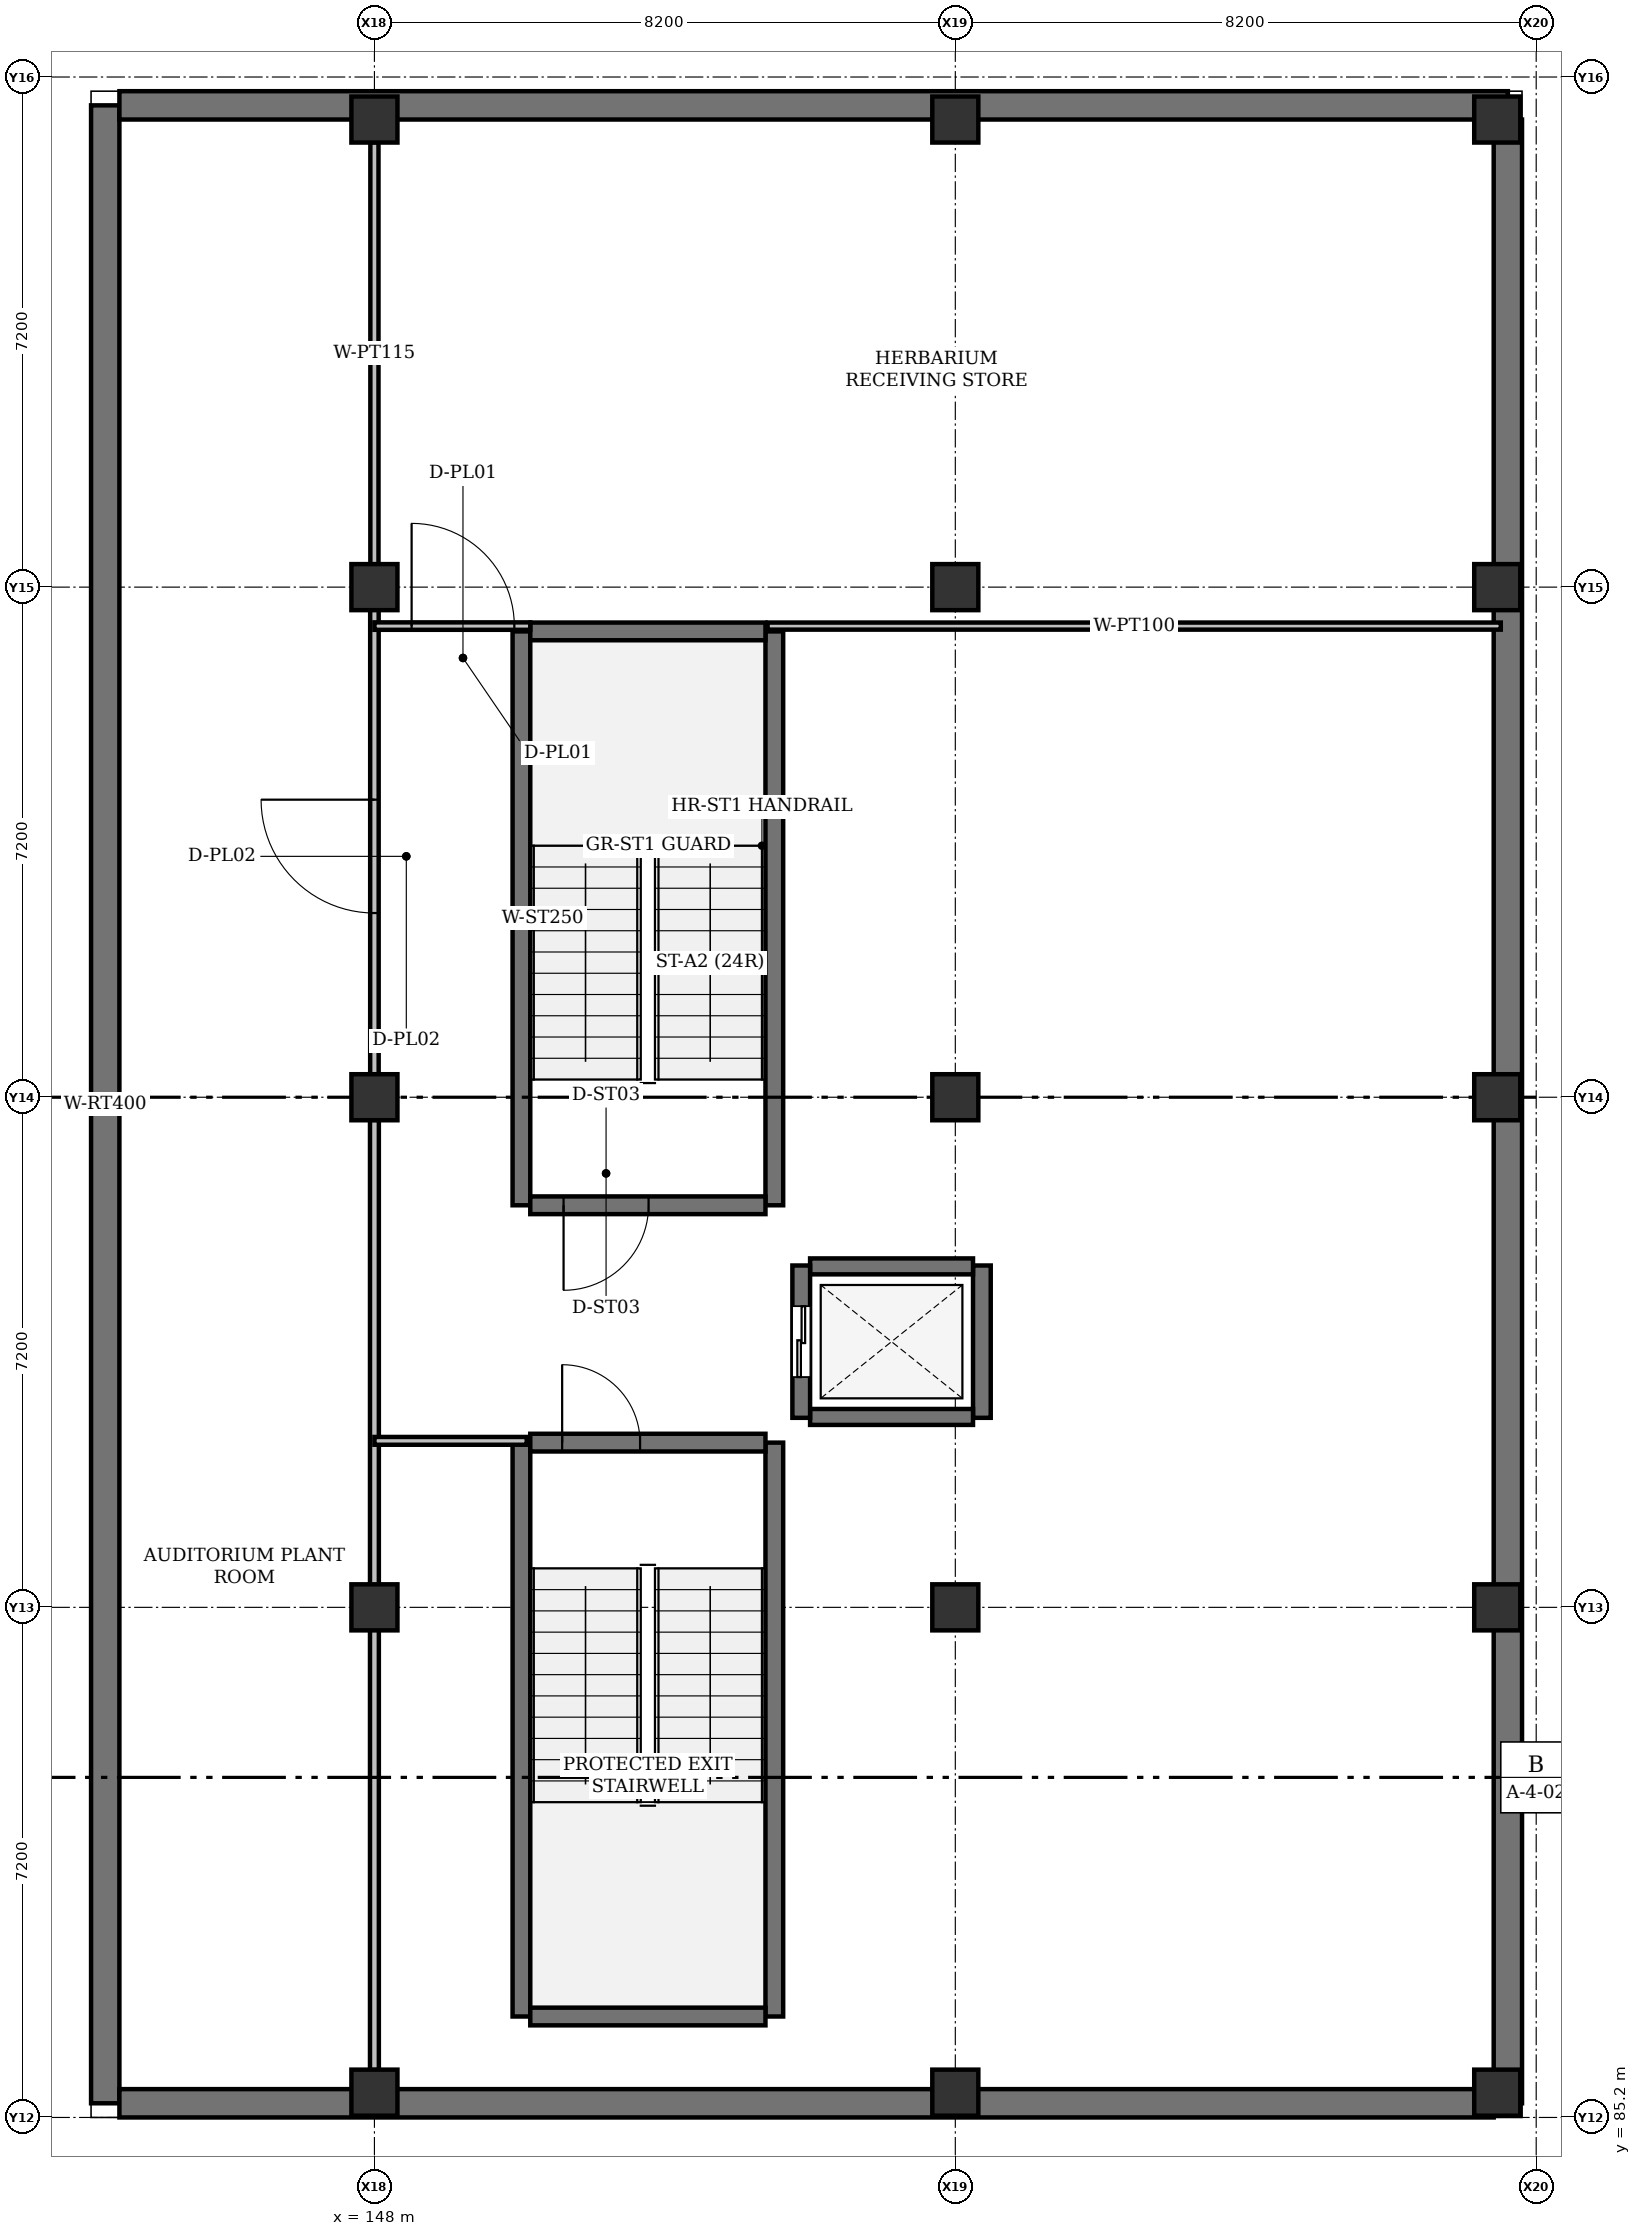
"""IFC4 building model, lengths in metres.
Left out: names, types, materials, properties, quantities, classifications, styles, units other than length and angle.
Written with IfcOpenShell. Run it as: python <this file> out.ifc"""

import sys

from ifc_helpers import new_model, si_unit, direction, frame, frame_2d, origin, origin_2d, place, context, subcontext, project, spatial, rectangle, extrude, element, fill, save


model = new_model("IFC4")
c1 = context("Model", 3, precision=1e-05, world=origin(), true_north=direction((0.0, 1.0)))
c2 = subcontext(c1, "Body", "Model", "MODEL_VIEW")
j1 = project(units=[si_unit("LENGTHUNIT", "METRE"), si_unit("PLANEANGLEUNIT", "RADIAN")], contexts=[c1])
p1 = place(None, origin())
s1 = spatial("IfcSite", under=j1, at=p1, CompositionType="ELEMENT")
p2 = place(p1, origin())
s2 = spatial("IfcBuilding", under=s1, at=p2, CompositionType="ELEMENT")
p3 = place(p2, frame((0.0, 0.0, -8.4)))
s3 = spatial("IfcBuildingStorey", under=s2, at=p3, CompositionType="ELEMENT", Elevation=-8.4)
for number, where, z_axis, x_axis in (
    (1, (148.0, 85.55, -0.3), (0.0, 0.0, 1.0), (1.0, 0.0, 0.0)),
    (2, (148.0, 92.4, -0.3), (0.0, 0.0, 1.0), (1.0, 0.0, 0.0)),
    (3, (148.0, 99.6, -0.3), (0.0, 0.0, 1.0), (1.0, 0.0, 0.0)),
    (4, (148.0, 106.8, -0.3), (0.0, 0.0, 1.0), (1.0, 0.0, 0.0)),
    (5, (148.0, 113.4, -0.3), (0.0, 0.0, 1.0), (1.0, 0.0, 0.0)),
    (6, (156.2, 85.55, -0.3), (0.0, 0.0, 1.0), (1.0, 0.0, 0.0)),
    (7, (156.2, 92.4, -0.3), (0.0, 0.0, 1.0), (1.0, 0.0, 0.0)),
    (8, (156.2, 99.6, -0.3), (0.0, 0.0, 1.0), (1.0, 0.0, 0.0)),
    (9, (156.2, 106.8, -0.3), (0.0, 0.0, 1.0), (1.0, 0.0, 0.0)),
    (10, (156.2, 113.4, -0.3), (0.0, 0.0, 1.0), (1.0, 0.0, 0.0)),
    (11, (163.85, 85.55, -0.3), (0.0, 0.0, 1.0), (1.0, 0.0, 0.0)),
    (12, (163.85, 92.4, -0.3), (0.0, 0.0, 1.0), (1.0, 0.0, 0.0)),
    (13, (163.85, 99.6, -0.3), (0.0, 0.0, 1.0), (1.0, 0.0, 0.0)),
    (14, (163.85, 106.8, -0.3), (0.0, 0.0, 1.0), (1.0, 0.0, 0.0)),
    (15, (163.85, 113.4, -0.3), (0.0, 0.0, 1.0), (1.0, 0.0, 0.0)),
):
    element("IfcColumn", number, at=place(p3, frame(where, z_axis=z_axis, x_axis=x_axis)), inside=s3, PredefinedType="COLUMN", context=c2, shape_type="SweptSolid", body=[
        extrude(rectangle(XDim=0.65, YDim=0.65, at=origin_2d()), origin(), (0.0, 0.0, 1.0), 4.5),
    ])
p4 = place(p3, frame((144.2, 85.4, -0.3), z_axis=(0.0, 0.0, 1.0), x_axis=(0.0, 1.0, 0.0)))
e16 = element("IfcWall", 16, at=p4, inside=s3, PredefinedType="USERDEFINED", context=c2, shape_type="SweptSolid", body=[
    extrude(rectangle(XDim=28.2, YDim=0.4, at=frame_2d((14.1, 0.0))), origin(), (0.0, 0.0, 1.0), 4.26),
])
p5 = place(p3, frame((144.4, 113.6, -0.3), z_axis=(0.0, 0.0, 1.0), x_axis=(1.0, 0.0, 0.0)))
e17 = element("IfcWall", 17, at=p5, inside=s3, PredefinedType="USERDEFINED", context=c2, shape_type="SweptSolid", body=[
    extrude(rectangle(XDim=19.6, YDim=0.4, at=frame_2d((9.8, 0.0))), origin(), (0.0, 0.0, 1.0), 4.26),
])
p6 = place(p3, frame((164.0, 113.4, -0.3), z_axis=(0.0, 0.0, 1.0), x_axis=(0.0, -1.0, 0.0)))
e18 = element("IfcWall", 18, at=p6, inside=s3, PredefinedType="USERDEFINED", context=c2, shape_type="SweptSolid", body=[
    extrude(rectangle(XDim=28.0, YDim=0.4, at=frame_2d((14.0, 0.0))), origin(), (0.0, 0.0, 1.0), 4.26),
])
p7 = place(p3, frame((163.8, 85.4, -0.3), z_axis=(0.0, 0.0, 1.0), x_axis=(-1.0, 0.0, 0.0)))
e19 = element("IfcWall", 19, at=p7, inside=s3, PredefinedType="USERDEFINED", context=c2, shape_type="SweptSolid", body=[
    extrude(rectangle(XDim=19.4, YDim=0.4, at=frame_2d((9.7, 0.0))), origin(), (0.0, 0.0, 1.0), 4.26),
])
for number, where, z_axis, x_axis in (
    (20, (150.075, 86.625, -0.3), (0.0, 0.0, 1.0), (0.0, 1.0, 0.0)),
    (21, (153.645, 86.625, -0.3), (0.0, 0.0, 1.0), (0.0, 1.0, 0.0)),
):
    element("IfcWall", number, at=place(p3, frame(where, z_axis=z_axis, x_axis=x_axis)), inside=s3, PredefinedType="SHEAR", context=c2, shape_type="SweptSolid", body=[
        extrude(rectangle(XDim=8.1, YDim=0.25, at=frame_2d((4.05, 0.0))), origin(), (0.0, 0.0, 1.0), 4.5),
    ])
p8 = place(p3, frame((150.2, 86.625, -0.3), z_axis=(0.0, 0.0, 1.0), x_axis=(1.0, 0.0, 0.0)))
e22 = element("IfcWall", 22, at=p8, inside=s3, PredefinedType="SHEAR", context=c2, shape_type="SweptSolid", body=[
    extrude(rectangle(XDim=3.32, YDim=0.25, at=frame_2d((1.66, 0.0))), origin(), (0.0, 0.0, 1.0), 4.5),
])
p9 = place(p3, frame((150.2, 94.725, -0.3), z_axis=(0.0, 0.0, 1.0), x_axis=(1.0, 0.0, 0.0)))
e23 = element("IfcWall", 23, at=p9, inside=s3, PredefinedType="SHEAR", context=c2, shape_type="SweptSolid", body=[
    extrude(rectangle(XDim=3.32, YDim=0.25, at=frame_2d((1.66, 0.0))), origin(), (0.0, 0.0, 1.0), 4.5),
])
p10 = place(p9, frame((0.45, 0.0, 0.3)))
e24 = element("IfcOpeningElement", 24, at=p10, cuts=e23, PredefinedType="OPENING", context=c2, shape_type="SweptSolid", body=[
    extrude(rectangle(XDim=1.1, YDim=2.15, at=frame_2d((0.55, 1.075))), frame((0.0, 0.125, 0.0), z_axis=(0.0, -1.0, 0.0), x_axis=(1.0, 0.0, 0.0)), (0.0, 0.0, 1.0), 0.25),
])
for number, where, z_axis, x_axis in (
    (25, (150.075, 98.075, -0.3), (0.0, 0.0, 1.0), (0.0, 1.0, 0.0)),
    (26, (153.645, 98.075, -0.3), (0.0, 0.0, 1.0), (0.0, 1.0, 0.0)),
):
    element("IfcWall", number, at=place(p3, frame(where, z_axis=z_axis, x_axis=x_axis)), inside=s3, PredefinedType="SHEAR", context=c2, shape_type="SweptSolid", body=[
        extrude(rectangle(XDim=8.1, YDim=0.25, at=frame_2d((4.05, 0.0))), origin(), (0.0, 0.0, 1.0), 4.5),
    ])
p11 = place(p3, frame((150.2, 106.175, -0.3), z_axis=(0.0, 0.0, 1.0), x_axis=(1.0, 0.0, 0.0)))
e27 = element("IfcWall", 27, at=p11, inside=s3, PredefinedType="SHEAR", context=c2, shape_type="SweptSolid", body=[
    extrude(rectangle(XDim=3.32, YDim=0.25, at=frame_2d((1.66, 0.0))), origin(), (0.0, 0.0, 1.0), 4.5),
])
p12 = place(p3, frame((153.52, 98.075, -0.3), z_axis=(0.0, 0.0, 1.0), x_axis=(-1.0, 0.0, 0.0)))
e28 = element("IfcWall", 28, at=p12, inside=s3, PredefinedType="SHEAR", context=c2, shape_type="SweptSolid", body=[
    extrude(rectangle(XDim=3.32, YDim=0.25, at=frame_2d((1.66, 0.0))), origin(), (0.0, 0.0, 1.0), 4.5),
])
p13 = place(p12, frame((1.65, 0.0, 0.3)))
e29 = element("IfcOpeningElement", 29, at=p13, cuts=e28, PredefinedType="OPENING", context=c2, shape_type="SweptSolid", body=[
    extrude(rectangle(XDim=1.2, YDim=2.2, at=frame_2d((0.6, 1.1))), frame((0.0, 0.125, 0.0), z_axis=(0.0, -1.0, 0.0), x_axis=(1.0, 0.0, 0.0)), (0.0, 0.0, 1.0), 0.25),
])
p14 = place(p3, frame((156.575, 95.075, -0.3), z_axis=(0.0, 0.0, 1.0), x_axis=(0.0, 1.0, 0.0)))
e30 = element("IfcWall", 30, at=p14, inside=s3, PredefinedType="SHEAR", context=c2, shape_type="SweptSolid", body=[
    extrude(rectangle(XDim=2.15, YDim=0.25, at=frame_2d((1.075, 0.0))), origin(), (0.0, 0.0, 1.0), 4.5),
])
for number, where, z_axis, x_axis in (
    (31, (154.15, 95.087, -0.3), (0.0, 0.0, 1.0), (1.0, 0.0, 0.0)),
    (32, (154.15, 97.212, -0.3), (0.0, 0.0, 1.0), (1.0, 0.0, 0.0)),
):
    element("IfcWall", number, at=place(p3, frame(where, z_axis=z_axis, x_axis=x_axis)), inside=s3, PredefinedType="SHEAR", context=c2, shape_type="SweptSolid", body=[
        extrude(rectangle(XDim=2.3, YDim=0.225, at=frame_2d((1.15, 0.0))), origin(), (0.0, 0.0, 1.0), 4.5),
    ])
p15 = place(p3, frame((154.025, 95.075, -0.3), z_axis=(0.0, 0.0, 1.0), x_axis=(0.0, 1.0, 0.0)))
e33 = element("IfcWall", 33, at=p15, inside=s3, PredefinedType="SHEAR", context=c2, shape_type="SweptSolid", body=[
    extrude(rectangle(XDim=2.15, YDim=0.25, at=frame_2d((1.075, 0.0))), origin(), (0.0, 0.0, 1.0), 4.5),
])
p16 = place(p15, frame((0.575, 0.0, 0.3)))
e34 = element("IfcOpeningElement", 34, at=p16, cuts=e33, PredefinedType="OPENING", context=c2, shape_type="SweptSolid", body=[
    extrude(rectangle(XDim=1.0, YDim=2.1, at=frame_2d((0.5, 1.05))), frame((0.0, 0.125, 0.0), z_axis=(0.0, -1.0, 0.0), x_axis=(1.0, 0.0, 0.0)), (0.0, 0.0, 1.0), 0.25),
])
p17 = place(p3, frame((148.0, 85.87, 0.0), z_axis=(0.0, 0.0, 1.0), x_axis=(0.0, 1.0, 0.0)))
e35 = element("IfcWall", 35, at=p17, inside=s3, PredefinedType="PARTITIONING", context=c2, shape_type="SweptSolid", body=[
    extrude(rectangle(XDim=13.41, YDim=0.125, at=frame_2d((6.705, 0.0))), origin(), (0.0, 0.0, 1.0), 3.95),
])
p18 = place(p3, frame((148.0, 99.92, 0.0), z_axis=(0.0, 0.0, 1.0), x_axis=(0.0, 1.0, 0.0)))
e36 = element("IfcWall", 36, at=p18, inside=s3, PredefinedType="PARTITIONING", context=c2, shape_type="SweptSolid", body=[
    extrude(rectangle(XDim=6.56, YDim=0.12, at=frame_2d((3.28, 0.0))), origin(), (0.0, 0.0, 1.0), 3.95),
])
p19 = place(p18, frame((2.28, 0.0, 0.0)))
e37 = element("IfcOpeningElement", 37, at=p19, cuts=e36, PredefinedType="OPENING", context=c2, shape_type="SweptSolid", body=[
    extrude(rectangle(XDim=1.6, YDim=2.25, at=frame_2d((0.8, 1.125))), frame((0.0, 0.06, 0.0), z_axis=(0.0, -1.0, 0.0), x_axis=(1.0, 0.0, 0.0)), (0.0, 0.0, 1.0), 0.12),
])
p20 = place(p3, frame((148.0, 107.12, 0.0), z_axis=(0.0, 0.0, 1.0), x_axis=(0.0, 1.0, 0.0)))
e38 = element("IfcWall", 38, at=p20, inside=s3, PredefinedType="PARTITIONING", context=c2, shape_type="SweptSolid", body=[
    extrude(rectangle(XDim=5.96, YDim=0.115, at=frame_2d((2.98, 0.0))), origin(), (0.0, 0.0, 1.0), 3.95),
])
p21 = place(p3, frame((148.0, 94.75, 0.0), z_axis=(0.0, 0.0, 1.0), x_axis=(1.0, 0.0, 0.0)))
e39 = element("IfcWall", 39, at=p21, inside=s3, PredefinedType="PARTITIONING", context=c2, shape_type="SweptSolid", body=[
    extrude(rectangle(XDim=2.15, YDim=0.11, at=frame_2d((1.075, 0.0))), origin(), (0.0, 0.0, 1.0), 3.95),
])
p22 = place(p3, frame((148.0, 106.25, 0.0), z_axis=(0.0, 0.0, 1.0), x_axis=(1.0, 0.0, 0.0)))
e40 = element("IfcWall", 40, at=p22, inside=s3, PredefinedType="PARTITIONING", context=c2, shape_type="SweptSolid", body=[
    extrude(rectangle(XDim=2.2, YDim=0.105, at=frame_2d((1.1, 0.0))), origin(), (0.0, 0.0, 1.0), 3.95),
])
p23 = place(p22, frame((0.525, 0.0, 0.0)))
e41 = element("IfcOpeningElement", 41, at=p23, cuts=e40, PredefinedType="OPENING", context=c2, shape_type="SweptSolid", body=[
    extrude(rectangle(XDim=1.45, YDim=2.2, at=frame_2d((0.725, 1.1))), frame((0.0, 0.052, 0.0), z_axis=(0.0, -1.0, 0.0), x_axis=(1.0, 0.0, 0.0)), (0.0, 0.0, 1.0), 0.105),
])
p24 = place(p3, frame((153.55, 106.25, 0.0), z_axis=(0.0, 0.0, 1.0), x_axis=(1.0, 0.0, 0.0)))
e42 = element("IfcWall", 42, at=p24, inside=s3, PredefinedType="PARTITIONING", context=c2, shape_type="SweptSolid", body=[
    extrude(rectangle(XDim=10.35, YDim=0.1, at=frame_2d((5.175, 0.0))), origin(), (0.0, 0.0, 1.0), 3.95),
])
p25 = place(p10, origin())
e43 = element("IfcDoor", 43, at=p25, inside=s3, OperationType="SINGLE_SWING_LEFT", PredefinedType="DOOR", context=c2, shape_type="SweptSolid", body=[
    extrude(rectangle(XDim=1.1, YDim=2.15, at=frame_2d((0.55, 1.075))), frame((0.0, 0.025, 0.0), z_axis=(0.0, -1.0, 0.0), x_axis=(1.0, 0.0, 0.0)), (0.0, 0.0, 1.0), 0.05),
])
fill(e24, e43)
p26 = place(p13, origin())
e44 = element("IfcDoor", 44, at=p26, inside=s3, OperationType="SINGLE_SWING_RIGHT", PredefinedType="DOOR", context=c2, shape_type="SweptSolid", body=[
    extrude(rectangle(XDim=1.2, YDim=2.2, at=frame_2d((0.6, 1.1))), frame((0.0, 0.025, 0.0), z_axis=(0.0, -1.0, 0.0), x_axis=(1.0, 0.0, 0.0)), (0.0, 0.0, 1.0), 0.05),
])
fill(e29, e44)
p27 = place(p16, origin())
e45 = element("IfcDoor", 45, at=p27, inside=s3, OperationType="SLIDING_TO_LEFT", PredefinedType="DOOR", context=c2, shape_type="SweptSolid", body=[
    extrude(rectangle(XDim=1.0, YDim=2.1, at=frame_2d((0.5, 1.05))), frame((0.0, 0.025, 0.0), z_axis=(0.0, -1.0, 0.0), x_axis=(1.0, 0.0, 0.0)), (0.0, 0.0, 1.0), 0.05),
])
fill(e34, e45)
p28 = place(p19, origin())
e46 = element("IfcDoor", 46, at=p28, inside=s3, OperationType="SINGLE_SWING_RIGHT", PredefinedType="DOOR", context=c2, shape_type="SweptSolid", body=[
    extrude(rectangle(XDim=1.6, YDim=2.25, at=frame_2d((0.8, 1.125))), frame((0.0, 0.025, 0.0), z_axis=(0.0, -1.0, 0.0), x_axis=(1.0, 0.0, 0.0)), (0.0, 0.0, 1.0), 0.05),
])
fill(e37, e46)
p29 = place(p23, origin())
e47 = element("IfcDoor", 47, at=p29, inside=s3, OperationType="SINGLE_SWING_LEFT", PredefinedType="DOOR", context=c2, shape_type="SweptSolid", body=[
    extrude(rectangle(XDim=1.45, YDim=2.2, at=frame_2d((0.725, 1.1))), frame((0.0, 0.025, 0.0), z_axis=(0.0, -1.0, 0.0), x_axis=(1.0, 0.0, 0.0)), (0.0, 0.0, 1.0), 0.05),
])
fill(e41, e47)
save(model, sys.argv[1])
